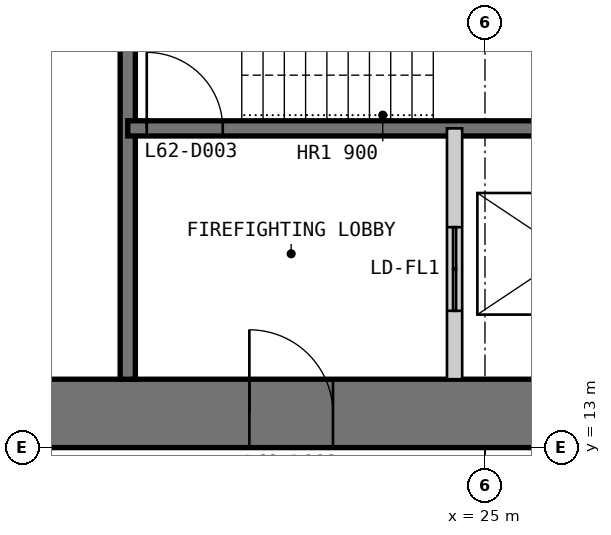
"""IFC4 building model, lengths in metres.
Left out: names, types, materials, properties, quantities, classifications, styles, units other than length and angle.
Written with IfcOpenShell. Run it as: python <this file> out.ifc"""

import sys

from ifc_helpers import new_model, si_unit, direction, frame, frame_2d, origin, place, context, subcontext, project, spatial, polyline, rectangle, outline, extrude, element, fill, save


model = new_model("IFC4")
c1 = context("Model", 3, precision=1e-05, world=origin(), true_north=direction((0.0, 1.0)))
c2 = subcontext(c1, "Body", "Model", "MODEL_VIEW")
j1 = project(units=[si_unit("LENGTHUNIT", "METRE"), si_unit("PLANEANGLEUNIT", "RADIAN")], contexts=[c1])
p1 = place(None, origin())
s1 = spatial("IfcSite", under=j1, at=p1, CompositionType="ELEMENT")
p2 = place(p1, origin())
s2 = spatial("IfcBuilding", under=s1, at=p2, CompositionType="ELEMENT")
p3 = place(p2, frame((0.0, 0.0, 262.8)))
s3 = spatial("IfcBuildingStorey", under=s2, at=p3, CompositionType="ELEMENT", Elevation=262.8)
p4 = place(p3, frame((13.0, 13.45, 0.0), z_axis=(0.0, 0.0, 1.0), x_axis=(1.0, 0.0, 0.0)))
e1 = element("IfcWall", 1, at=p4, inside=s3, PredefinedType="SHEAR", context=c2, shape_type="SweptSolid", body=[
    extrude(outline(polyline([(0.0, -0.45), (24.0, -0.45), (23.1, 0.45), (0.9, 0.45), (0.0, -0.45)])), origin(), (0.0, 0.0, 1.0), 3.4),
])
p5 = place(p4, frame((4.9, 0.0, 0.0)))
e2 = element("IfcOpeningElement", 2, at=p5, cuts=e1, PredefinedType="OPENING", context=c2, shape_type="SweptSolid", body=[
    extrude(rectangle(XDim=1.0, YDim=2.2, at=frame_2d((0.5, 1.1))), frame((0.0, 0.46, 0.0), z_axis=(0.0, -1.0, 0.0), x_axis=(1.0, 0.0, 0.0)), (0.0, 0.0, 1.0), 0.92),
])
p6 = place(p4, frame((8.9, 0.0, 0.0)))
e3 = element("IfcOpeningElement", 3, at=p6, cuts=e1, PredefinedType="OPENING", context=c2, shape_type="SweptSolid", body=[
    extrude(rectangle(XDim=1.1, YDim=2.2, at=frame_2d((0.55, 1.1))), frame((0.0, 0.46, 0.0), z_axis=(0.0, -1.0, 0.0), x_axis=(1.0, 0.0, 0.0)), (0.0, 0.0, 1.0), 0.92),
])
p7 = place(p4, frame((15.05, 0.0, 0.0)))
e4 = element("IfcOpeningElement", 4, at=p7, cuts=e1, PredefinedType="OPENING", context=c2, shape_type="SweptSolid", body=[
    extrude(rectangle(XDim=0.9, YDim=2.2, at=frame_2d((0.45, 1.1))), frame((0.0, 0.46, 0.0), z_axis=(0.0, -1.0, 0.0), x_axis=(1.0, 0.0, 0.0)), (0.0, 0.0, 1.0), 0.92),
])
p8 = place(p4, frame((17.9, 0.0, 0.0)))
e5 = element("IfcOpeningElement", 5, at=p8, cuts=e1, PredefinedType="OPENING", context=c2, shape_type="SweptSolid", body=[
    extrude(rectangle(XDim=1.0, YDim=2.2, at=frame_2d((0.5, 1.1))), frame((0.0, 0.46, 0.0), z_axis=(0.0, -1.0, 0.0), x_axis=(1.0, 0.0, 0.0)), (0.0, 0.0, 1.0), 0.92),
])
p9 = place(p4, frame((21.4, 0.0, 0.0)))
e6 = element("IfcOpeningElement", 6, at=p9, cuts=e1, PredefinedType="OPENING", context=c2, shape_type="SweptSolid", body=[
    extrude(rectangle(XDim=1.0, YDim=2.2, at=frame_2d((0.5, 1.1))), frame((0.0, 0.46, 0.0), z_axis=(0.0, -1.0, 0.0), x_axis=(1.0, 0.0, 0.0)), (0.0, 0.0, 1.0), 0.92),
])
p10 = place(p3, frame((20.3, 13.9, 0.0), z_axis=(0.0, 0.0, 1.0), x_axis=(0.0, 1.0, 0.0)))
e7 = element("IfcWall", 7, at=p10, inside=s3, PredefinedType="SOLIDWALL", context=c2, shape_type="SweptSolid", body=[
    extrude(rectangle(XDim=16.1, YDim=0.2, at=frame_2d((8.05, 0.0))), origin(), (0.0, 0.0, 1.0), 3.2),
])
p11 = place(p10, frame((6.4, 0.0, 0.0)))
e8 = element("IfcOpeningElement", 8, at=p11, cuts=e7, PredefinedType="OPENING", context=c2, shape_type="SweptSolid", body=[
    extrude(rectangle(XDim=0.9, YDim=2.2, at=frame_2d((0.45, 1.1))), frame((0.0, 0.11, 0.0), z_axis=(0.0, -1.0, 0.0), x_axis=(1.0, 0.0, 0.0)), (0.0, 0.0, 1.0), 0.22),
])
p12 = place(p10, frame((11.4, 0.0, 0.0)))
e9 = element("IfcOpeningElement", 9, at=p12, cuts=e7, PredefinedType="OPENING", context=c2, shape_type="SweptSolid", body=[
    extrude(rectangle(XDim=0.9, YDim=2.2, at=frame_2d((0.45, 1.1))), frame((0.0, 0.11, 0.0), z_axis=(0.0, -1.0, 0.0), x_axis=(1.0, 0.0, 0.0)), (0.0, 0.0, 1.0), 0.22),
])
p13 = place(p3, frame((20.3, 17.2, 0.0), z_axis=(0.0, 0.0, 1.0), x_axis=(1.0, 0.0, 0.0)))
e10 = element("IfcWall", 10, at=p13, inside=s3, PredefinedType="SOLIDWALL", context=c2, shape_type="SweptSolid", body=[
    extrude(rectangle(XDim=9.4, YDim=0.2, at=frame_2d((4.7, 0.0))), origin(), (0.0, 0.0, 1.0), 3.2),
])
p14 = place(p13, frame((0.25, 0.0, 0.0)))
e11 = element("IfcOpeningElement", 11, at=p14, cuts=e10, PredefinedType="OPENING", context=c2, shape_type="SweptSolid", body=[
    extrude(rectangle(XDim=1.0, YDim=2.2, at=frame_2d((0.5, 1.1))), frame((0.0, 0.11, 0.0), z_axis=(0.0, -1.0, 0.0), x_axis=(1.0, 0.0, 0.0)), (0.0, 0.0, 1.0), 0.22),
])
p15 = place(p3, frame((24.6, 13.9, 0.0), z_axis=(0.0, 0.0, 1.0), x_axis=(0.0, 1.0, 0.0)))
e12 = element("IfcWall", 12, at=p15, inside=s3, PredefinedType="PARTITIONING", context=c2, shape_type="SweptSolid", body=[
    extrude(rectangle(XDim=3.3, YDim=0.2, at=frame_2d((1.65, 0.0))), origin(), (0.0, 0.0, 1.0), 3.2),
])
p16 = place(p15, frame((0.9, 0.0, 0.0)))
e13 = element("IfcOpeningElement", 13, at=p16, cuts=e12, PredefinedType="OPENING", context=c2, shape_type="SweptSolid", body=[
    extrude(rectangle(XDim=1.1, YDim=2.2, at=frame_2d((0.55, 1.1))), frame((0.0, 0.11, 0.0), z_axis=(0.0, -1.0, 0.0), x_axis=(1.0, 0.0, 0.0)), (0.0, 0.0, 1.0), 0.22),
])
p17 = place(p6, origin())
e14 = element("IfcDoor", 14, at=p17, inside=s3, OperationType="SINGLE_SWING_LEFT", PredefinedType="DOOR", context=c2, shape_type="SweptSolid", body=[
    extrude(rectangle(XDim=1.1, YDim=2.2, at=frame_2d((0.55, 1.1))), frame((0.0, 0.025, 0.0), z_axis=(0.0, -1.0, 0.0), x_axis=(1.0, 0.0, 0.0)), (0.0, 0.0, 1.0), 0.05),
    extrude(outline(polyline([(0.0, 0.0), (0.04, 0.0), (0.04, 2.16), (1.06, 2.16), (1.06, 0.0), (1.1, 0.0), (1.1, 2.2), (0.0, 2.2), (0.0, 0.0)])), frame((0.0, 0.3, 0.0), z_axis=(0.0, -1.0, 0.0), x_axis=(1.0, 0.0, 0.0)), (0.0, 0.0, 1.0), 0.6),
])
fill(e3, e14)
p18 = place(p14, origin())
e15 = element("IfcDoor", 15, at=p18, inside=s3, OperationType="SINGLE_SWING_LEFT", PredefinedType="DOOR", context=c2, shape_type="SweptSolid", body=[
    extrude(rectangle(XDim=1.0, YDim=2.2, at=frame_2d((0.5, 1.1))), frame((0.0, 0.025, 0.0), z_axis=(0.0, -1.0, 0.0), x_axis=(1.0, 0.0, 0.0)), (0.0, 0.0, 1.0), 0.05),
])
fill(e11, e15)
p19 = place(p16, origin())
e16 = element("IfcDoor", 16, at=p19, inside=s3, OperationType="DOUBLE_DOOR_SLIDING", PredefinedType="DOOR", context=c2, shape_type="SweptSolid", body=[
    extrude(rectangle(XDim=1.1, YDim=2.2, at=frame_2d((0.55, 1.1))), frame((0.0, 0.025, 0.0), z_axis=(0.0, -1.0, 0.0), x_axis=(1.0, 0.0, 0.0)), (0.0, 0.0, 1.0), 0.05),
])
fill(e13, e16)
save(model, sys.argv[1])
